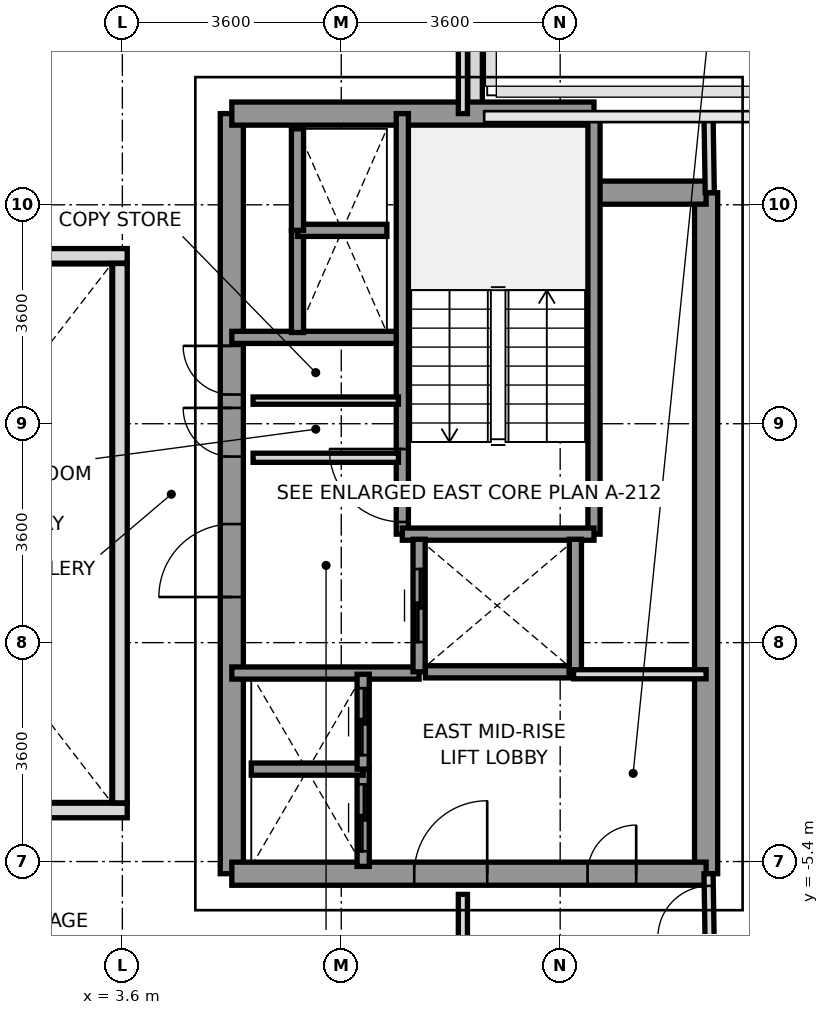
"""IFC4 building model, lengths in metres.
Left out: names, types, materials, properties, quantities, classifications, styles, units other than length and angle.
Written with IfcOpenShell. Run it as: python <this file> out.ifc"""

import sys

from ifc_helpers import new_model, si_unit, direction, frame, frame_2d, origin, place, context, subcontext, project, spatial, rectangle, extrude, source, transform, mapped, element, fill, save


model = new_model("IFC4")
c1 = context("Model", 3, precision=1e-05, world=origin(), true_north=direction((0.0, 1.0)))
c2 = subcontext(c1, "Body", "Model", "MODEL_VIEW")
j1 = project(units=[si_unit("LENGTHUNIT", "METRE"), si_unit("PLANEANGLEUNIT", "RADIAN")], contexts=[c1])
p1 = place(None, origin())
s1 = spatial("IfcSite", under=j1, at=p1, CompositionType="ELEMENT")
p2 = place(p1, origin())
s2 = spatial("IfcBuilding", under=s1, at=p2, CompositionType="ELEMENT")
p3 = place(p2, frame((0.0, 0.0, 167.2)))
s3 = spatial("IfcBuildingStorey", under=s2, at=p3, CompositionType="ELEMENT", Elevation=167.2)
p4 = place(p3, frame((9.4, 8.547, 0.0), z_axis=(0.0, 0.0, 1.0), x_axis=(0.0, -1.0, 0.0)))
e1 = element("IfcWall", 1, at=p4, inside=s3, PredefinedType="PARAPET", context=c2, shape_type="SweptSolid", body=[
    extrude(rectangle(XDim=1.594, YDim=0.24, at=frame_2d((0.797, 0.0))), origin(), (0.0, 0.0, 1.0), 1.15),
])
p5 = place(p3, frame((13.2, -5.6, 0.0), z_axis=(0.0, 0.0, 1.0), x_axis=(0.0, 1.0, 0.0)))
e2 = element("IfcWall", 2, at=p5, inside=s3, PredefinedType="SHEAR", context=c2, shape_type="SweptSolid", body=[
    extrude(rectangle(XDim=11.2, YDim=0.38, at=frame_2d((5.6, 0.0))), origin(), (0.0, 0.0, 1.0), 3.2),
])
p6 = place(p3, frame((5.4, -5.6, 0.0), z_axis=(0.0, 0.0, 1.0), x_axis=(0.0, 1.0, 0.0)))
e3 = element("IfcWall", 3, at=p6, inside=s3, PredefinedType="SHEAR", context=c2, shape_type="SweptSolid", body=[
    extrude(rectangle(XDim=12.5, YDim=0.38, at=frame_2d((6.25, 0.0))), origin(), (0.0, 0.0, 1.0), 3.2),
])
p7 = place(p6, frame((4.55, 0.0, 0.0)))
e4 = element("IfcOpeningElement", 4, at=p7, cuts=e3, PredefinedType="OPENING", context=c2, shape_type="SweptSolid", body=[
    extrude(rectangle(XDim=1.2, YDim=2.2, at=frame_2d((0.6, 1.1))), frame((0.0, 0.2, 0.0), z_axis=(0.0, -1.0, 0.0), x_axis=(1.0, 0.0, 0.0)), (0.0, 0.0, 1.0), 0.4),
])
p8 = place(p6, frame((6.86, 0.0, 0.0)))
e5 = element("IfcOpeningElement", 5, at=p8, cuts=e3, PredefinedType="OPENING", context=c2, shape_type="SweptSolid", body=[
    extrude(rectangle(XDim=0.8, YDim=2.1, at=frame_2d((0.4, 1.05))), frame((0.0, 0.2, 0.0), z_axis=(0.0, -1.0, 0.0), x_axis=(1.0, 0.0, 0.0)), (0.0, 0.0, 1.0), 0.4),
])
p9 = place(p6, frame((7.88, 0.0, 0.0)))
e6 = element("IfcOpeningElement", 6, at=p9, cuts=e3, PredefinedType="OPENING", context=c2, shape_type="SweptSolid", body=[
    extrude(rectangle(XDim=0.8, YDim=2.1, at=frame_2d((0.4, 1.05))), frame((0.0, 0.2, 0.0), z_axis=(0.0, -1.0, 0.0), x_axis=(1.0, 0.0, 0.0)), (0.0, 0.0, 1.0), 0.4),
])
p10 = place(p3, frame((5.4, 6.9, 0.0), z_axis=(0.0, 0.0, 1.0), x_axis=(1.0, 0.0, 0.0)))
e7 = element("IfcWall", 7, at=p10, inside=s3, PredefinedType="SHEAR", context=c2, shape_type="SweptSolid", body=[
    extrude(rectangle(XDim=5.956, YDim=0.38, at=frame_2d((2.978, 0.0))), origin(), (0.0, 0.0, 1.0), 3.2),
])
p11 = place(p3, frame((11.356, 5.6, 0.0), z_axis=(0.0, 0.0, 1.0), x_axis=(1.0, 0.0, 0.0)))
e8 = element("IfcWall", 8, at=p11, inside=s3, PredefinedType="SHEAR", context=c2, shape_type="SweptSolid", body=[
    extrude(rectangle(XDim=1.844, YDim=0.38, at=frame_2d((0.922, 0.0))), origin(), (0.0, 0.0, 1.0), 3.2),
])
p12 = place(p3, frame((5.4, -5.6, 0.0), z_axis=(0.0, 0.0, 1.0), x_axis=(1.0, 0.0, 0.0)))
e9 = element("IfcWall", 9, at=p12, inside=s3, PredefinedType="SHEAR", context=c2, shape_type="SweptSolid", body=[
    extrude(rectangle(XDim=7.8, YDim=0.38, at=frame_2d((3.9, 0.0))), origin(), (0.0, 0.0, 1.0), 3.2),
])
p13 = place(p12, frame((3.0, 0.0, 0.0)))
e10 = element("IfcOpeningElement", 10, at=p13, cuts=e9, PredefinedType="OPENING", context=c2, shape_type="SweptSolid", body=[
    extrude(rectangle(XDim=1.2, YDim=2.2, at=frame_2d((0.6, 1.1))), frame((0.0, 0.2, 0.0), z_axis=(0.0, -1.0, 0.0), x_axis=(1.0, 0.0, 0.0)), (0.0, 0.0, 1.0), 0.4),
])
p14 = place(p12, frame((5.85, 0.0, 0.0)))
e11 = element("IfcOpeningElement", 11, at=p14, cuts=e9, PredefinedType="OPENING", context=c2, shape_type="SweptSolid", body=[
    extrude(rectangle(XDim=0.8, YDim=2.1, at=frame_2d((0.4, 1.05))), frame((0.0, 0.2, 0.0), z_axis=(0.0, -1.0, 0.0), x_axis=(1.0, 0.0, 0.0)), (0.0, 0.0, 1.0), 0.4),
])
p15 = place(p3, frame((5.4, 3.22, 0.0), z_axis=(0.0, 0.0, 1.0), x_axis=(1.0, 0.0, 0.0)))
e12 = element("IfcWall", 12, at=p15, inside=s3, PredefinedType="SOLIDWALL", context=c2, shape_type="SweptSolid", body=[
    extrude(rectangle(XDim=2.78, YDim=0.2, at=frame_2d((1.39, 0.0))), origin(), (0.0, 0.0, 1.0), 3.2),
])
p16 = place(p3, frame((5.4, -2.3, 0.0), z_axis=(0.0, 0.0, 1.0), x_axis=(1.0, 0.0, 0.0)))
e13 = element("IfcWall", 13, at=p16, inside=s3, PredefinedType="SOLIDWALL", context=c2, shape_type="SweptSolid", body=[
    extrude(rectangle(XDim=3.08, YDim=0.2, at=frame_2d((1.54, 0.0))), origin(), (0.0, 0.0, 1.0), 3.2),
])
p17 = place(p3, frame((8.204, -0.016, 0.0), z_axis=(0.0, 0.0, 1.0), x_axis=(0.0, 1.0, 0.0)))
e14 = element("IfcWall", 14, at=p17, inside=s3, PredefinedType="SOLIDWALL", context=c2, shape_type="SweptSolid", body=[
    extrude(rectangle(XDim=6.916, YDim=0.2, at=frame_2d((3.458, 0.0))), origin(), (0.0, 0.0, 1.0), 3.2),
])
p18 = place(p17, frame((0.2, 0.0, 0.0)))
e15 = element("IfcOpeningElement", 15, at=p18, cuts=e14, PredefinedType="OPENING", context=c2, shape_type="SweptSolid", body=[
    extrude(rectangle(XDim=1.2, YDim=2.2, at=frame_2d((0.6, 1.1))), frame((0.0, 0.11, 0.0), z_axis=(0.0, -1.0, 0.0), x_axis=(1.0, 0.0, 0.0)), (0.0, 0.0, 1.0), 0.22),
])
p19 = place(p3, frame((11.356, -0.016, 0.0), z_axis=(0.0, 0.0, 1.0), x_axis=(0.0, 1.0, 0.0)))
e16 = element("IfcWall", 16, at=p19, inside=s3, PredefinedType="SOLIDWALL", context=c2, shape_type="SweptSolid", body=[
    extrude(rectangle(XDim=6.916, YDim=0.2, at=frame_2d((3.458, 0.0))), origin(), (0.0, 0.0, 1.0), 3.2),
])
p20 = place(p3, frame((8.204, -0.016, 0.0), z_axis=(0.0, 0.0, 1.0), x_axis=(1.0, 0.0, 0.0)))
e17 = element("IfcWall", 17, at=p20, inside=s3, PredefinedType="SOLIDWALL", context=c2, shape_type="SweptSolid", body=[
    extrude(rectangle(XDim=3.152, YDim=0.2, at=frame_2d((1.576, 0.0))), origin(), (0.0, 0.0, 1.0), 3.2),
])
p21 = place(p3, frame((8.48, -2.28, 0.0), z_axis=(0.0, 0.0, 1.0), x_axis=(0.0, 1.0, 0.0)))
e18 = element("IfcWall", 18, at=p21, inside=s3, PredefinedType="SOLIDWALL", context=c2, shape_type="SweptSolid", body=[
    extrude(rectangle(XDim=2.18, YDim=0.2, at=frame_2d((1.09, 0.0))), origin(), (0.0, 0.0, 1.0), 3.2),
])
p22 = place(p21, frame((0.49, 0.0, 0.0)))
e19 = element("IfcOpeningElement", 19, at=p22, cuts=e18, PredefinedType="OPENING", context=c2, shape_type="SweptSolid", body=[
    extrude(rectangle(XDim=1.2, YDim=2.2, at=frame_2d((0.6, 1.1))), frame((0.0, 0.11, 0.0), z_axis=(0.0, -1.0, 0.0), x_axis=(1.0, 0.0, 0.0)), (0.0, 0.0, 1.0), 0.22),
])
p23 = place(p3, frame((11.05, -2.28, 0.0), z_axis=(0.0, 0.0, 1.0), x_axis=(0.0, 1.0, 0.0)))
e20 = element("IfcWall", 20, at=p23, inside=s3, PredefinedType="SOLIDWALL", context=c2, shape_type="SweptSolid", body=[
    extrude(rectangle(XDim=2.18, YDim=0.2, at=frame_2d((1.09, 0.0))), origin(), (0.0, 0.0, 1.0), 3.2),
])
p24 = place(p3, frame((8.584, -2.28, 0.0), z_axis=(0.0, 0.0, 1.0), x_axis=(1.0, 0.0, 0.0)))
e21 = element("IfcWall", 21, at=p24, inside=s3, PredefinedType="SOLIDWALL", context=c2, shape_type="SweptSolid", body=[
    extrude(rectangle(XDim=2.362, YDim=0.2, at=frame_2d((1.181, 0.0))), origin(), (0.0, 0.0, 1.0), 3.2),
])
p25 = place(p3, frame((7.56, -5.48, 0.0), z_axis=(0.0, 0.0, 1.0), x_axis=(0.0, 1.0, 0.0)))
e22 = element("IfcWall", 22, at=p25, inside=s3, PredefinedType="SOLIDWALL", context=c2, shape_type="SweptSolid", body=[
    extrude(rectangle(XDim=1.6, YDim=0.2, at=frame_2d((0.8, 0.0))), origin(), (0.0, 0.0, 1.0), 3.2),
])
p26 = place(p25, frame((0.25, 0.0, 0.0)))
e23 = element("IfcOpeningElement", 23, at=p26, cuts=e22, PredefinedType="OPENING", context=c2, shape_type="SweptSolid", body=[
    extrude(rectangle(XDim=1.1, YDim=2.2, at=frame_2d((0.55, 1.1))), frame((0.0, 0.11, 0.0), z_axis=(0.0, -1.0, 0.0), x_axis=(1.0, 0.0, 0.0)), (0.0, 0.0, 1.0), 0.22),
])
p27 = place(p3, frame((5.72, -3.88, 0.0), z_axis=(0.0, 0.0, 1.0), x_axis=(1.0, 0.0, 0.0)))
e24 = element("IfcWall", 24, at=p27, inside=s3, PredefinedType="SOLIDWALL", context=c2, shape_type="SweptSolid", body=[
    extrude(rectangle(XDim=1.84, YDim=0.2, at=frame_2d((0.92, 0.0))), origin(), (0.0, 0.0, 1.0), 3.2),
])
p28 = place(p3, frame((7.56, -3.88, 0.0), z_axis=(0.0, 0.0, 1.0), x_axis=(0.0, 1.0, 0.0)))
e25 = element("IfcWall", 25, at=p28, inside=s3, PredefinedType="SOLIDWALL", context=c2, shape_type="SweptSolid", body=[
    extrude(rectangle(XDim=1.56, YDim=0.2, at=frame_2d((0.78, 0.0))), origin(), (0.0, 0.0, 1.0), 3.2),
])
p29 = place(p28, frame((0.23, 0.0, 0.0)))
e26 = element("IfcOpeningElement", 26, at=p29, cuts=e25, PredefinedType="OPENING", context=c2, shape_type="SweptSolid", body=[
    extrude(rectangle(XDim=1.1, YDim=2.2, at=frame_2d((0.55, 1.1))), frame((0.0, 0.11, 0.0), z_axis=(0.0, -1.0, 0.0), x_axis=(1.0, 0.0, 0.0)), (0.0, 0.0, 1.0), 0.22),
])
p30 = place(p3, frame((6.48, 3.3, 0.0), z_axis=(0.0, 0.0, 1.0), x_axis=(0.0, 1.0, 0.0)))
e27 = element("IfcWall", 27, at=p30, inside=s3, PredefinedType="SOLIDWALL", context=c2, shape_type="SweptSolid", body=[
    extrude(rectangle(XDim=1.68, YDim=0.2, at=frame_2d((0.84, 0.0))), origin(), (0.0, 0.0, 1.0), 3.2),
])
p31 = place(p3, frame((6.48, 4.98, 0.0), z_axis=(0.0, 0.0, 1.0), x_axis=(1.0, 0.0, 0.0)))
e28 = element("IfcWall", 28, at=p31, inside=s3, PredefinedType="SOLIDWALL", context=c2, shape_type="SweptSolid", body=[
    extrude(rectangle(XDim=1.47, YDim=0.2, at=frame_2d((0.735, 0.0))), origin(), (0.0, 0.0, 1.0), 3.2),
])
p32 = place(p3, frame((6.48, 4.98, 0.0), z_axis=(0.0, 0.0, 1.0), x_axis=(0.0, 1.0, 0.0)))
e29 = element("IfcWall", 29, at=p32, inside=s3, PredefinedType="SOLIDWALL", context=c2, shape_type="SweptSolid", body=[
    extrude(rectangle(XDim=1.67, YDim=0.2, at=frame_2d((0.835, 0.0))), origin(), (0.0, 0.0, 1.0), 3.2),
])
p33 = place(p3, frame((5.75, 1.24, 0.0), z_axis=(0.0, 0.0, 1.0), x_axis=(1.0, 0.0, 0.0)))
e30 = element("IfcWall", 30, at=p33, inside=s3, PredefinedType="PARTITIONING", context=c2, shape_type="SweptSolid", body=[
    extrude(rectangle(XDim=2.39, YDim=0.15, at=frame_2d((1.195, 0.0))), origin(), (0.0, 0.0, 1.0), 2.3),
])
p34 = place(p3, frame((5.75, 2.18, 0.0), z_axis=(0.0, 0.0, 1.0), x_axis=(1.0, 0.0, 0.0)))
e31 = element("IfcWall", 31, at=p34, inside=s3, PredefinedType="PARTITIONING", context=c2, shape_type="SweptSolid", body=[
    extrude(rectangle(XDim=2.39, YDim=0.12, at=frame_2d((1.195, 0.0))), origin(), (0.0, 0.0, 1.0), 2.3),
])
p35 = place(p3, frame((11.02, -2.32, 0.0), z_axis=(0.0, 0.0, 1.0), x_axis=(1.0, 0.0, 0.0)))
e32 = element("IfcWall", 32, at=p35, inside=s3, PredefinedType="PARTITIONING", context=c2, shape_type="SweptSolid", body=[
    extrude(rectangle(XDim=2.18, YDim=0.15, at=frame_2d((1.09, 0.0))), origin(), (0.0, 0.0, 1.0), 3.2),
])
p36 = place(p3, frame((9.2, 6.9, 0.0), z_axis=(0.0, 0.0, 1.0), x_axis=(0.0, 1.0, 0.0)))
e33 = element("IfcWall", 33, at=p36, inside=s3, PredefinedType="PARTITIONING", context=c2, shape_type="SweptSolid", body=[
    extrude(rectangle(XDim=8.78, YDim=0.15, at=frame_2d((4.39, 0.0))), origin(), (0.0, 0.0, 1.0), 2.75),
])
p37 = place(p3, frame((9.2, -15.68, 0.0), z_axis=(0.0, 0.0, 1.0), x_axis=(0.0, 1.0, 0.0)))
e34 = element("IfcWall", 34, at=p37, inside=s3, PredefinedType="PARTITIONING", context=c2, shape_type="SweptSolid", body=[
    extrude(rectangle(XDim=9.74, YDim=0.15, at=frame_2d((4.87, 0.0))), origin(), (0.0, 0.0, 1.0), 2.75),
])
p38 = place(p3, frame((13.26, 5.6, 0.0), z_axis=(0.0, 0.0, 1.0), x_axis=(-0.016013571389, 0.999871774545, 0.0)))
e35 = element("IfcWall", 35, at=p38, inside=s3, PredefinedType="PARTITIONING", context=c2, shape_type="SweptSolid", body=[
    extrude(rectangle(XDim=1.25, YDim=0.15, at=frame_2d((0.625, 0.0))), origin(), (0.0, 0.0, 1.0), 3.2),
])
p39 = place(p3, frame((13.26, -6.85, 0.0), z_axis=(0.0, 0.0, 1.0), x_axis=(-0.016013571389, 0.999871774545, 0.0)))
e36 = element("IfcWall", 36, at=p39, inside=s3, PredefinedType="PARTITIONING", context=c2, shape_type="SweptSolid", body=[
    extrude(rectangle(XDim=1.25, YDim=0.15, at=frame_2d((0.625, 0.0))), origin(), (0.0, 0.0, 1.0), 3.2),
])
p40 = place(p39, frame((0.2, 0.0, 0.0)))
e37 = element("IfcOpeningElement", 37, at=p40, cuts=e36, PredefinedType="OPENING", context=c2, shape_type="SweptSolid", body=[
    extrude(rectangle(XDim=0.85, YDim=2.1, at=frame_2d((0.425, 1.05))), frame((0.0, 0.085, 0.0), z_axis=(0.0, -1.0, 0.0), x_axis=(1.0, 0.0, 0.0)), (0.0, 0.0, 1.0), 0.17),
])
for number, where, z_axis, x_axis in (
    (38, (-3.68, -4.56, 0.0), (0.0, 0.0, 1.0), (1.0, 0.0, 0.0)),
    (39, (-3.68, 4.56, 0.0), (0.0, 0.0, 1.0), (1.0, 0.0, 0.0)),
):
    element("IfcWall", number, at=place(p3, frame(where, z_axis=z_axis, x_axis=x_axis)), inside=s3, PredefinedType="PARAPET", context=c2, shape_type="SweptSolid", body=[
        extrude(rectangle(XDim=7.36, YDim=0.24, at=frame_2d((3.68, 0.0))), origin(), (0.0, 0.0, 1.0), 1.15),
    ])
p41 = place(p3, frame((3.56, -4.435, 0.0), z_axis=(0.0, 0.0, 1.0), x_axis=(0.0, 1.0, 0.0)))
e40 = element("IfcWall", 40, at=p41, inside=s3, PredefinedType="PARAPET", context=c2, shape_type="SweptSolid", body=[
    extrude(rectangle(XDim=8.87, YDim=0.24, at=frame_2d((4.435, 0.0))), origin(), (0.0, 0.0, 1.0), 1.15),
])
m1 = source(origin(), c2, "Body", "SweptSolid", [
    extrude(rectangle(XDim=1.2, YDim=2.2, at=frame_2d((0.6, 1.1))), frame((0.0, 0.025, 0.0), z_axis=(0.0, -1.0, 0.0), x_axis=(1.0, 0.0, 0.0)), (0.0, 0.0, 1.0), 0.05),
])
p42 = place(p18, origin())
e41 = element("IfcDoor", 41, at=p42, inside=s3, OperationType="SINGLE_SWING_RIGHT", PredefinedType="DOOR", context=c2, shape_type="MappedRepresentation", body=[
    mapped(m1, transform((0.0, 0.0, 0.0), x_axis=(1.0, 0.0, 0.0), y_axis=(0.0, 1.0, 0.0), z_axis=(0.0, 0.0, 1.0), scale=1.0)),
])
fill(e15, e41)
p43 = place(p7, origin())
e42 = element("IfcDoor", 42, at=p43, inside=s3, OperationType="SINGLE_SWING_LEFT", PredefinedType="DOOR", context=c2, shape_type="MappedRepresentation", body=[
    mapped(m1, transform((0.0, 0.0, 0.0), x_axis=(1.0, 0.0, 0.0), y_axis=(0.0, 1.0, 0.0), z_axis=(0.0, 0.0, 1.0), scale=1.0)),
])
fill(e4, e42)
p44 = place(p13, origin())
e43 = element("IfcDoor", 43, at=p44, inside=s3, OperationType="SINGLE_SWING_RIGHT", PredefinedType="DOOR", context=c2, shape_type="MappedRepresentation", body=[
    mapped(m1, transform((0.0, 0.0, 0.0), x_axis=(1.0, 0.0, 0.0), y_axis=(0.0, 1.0, 0.0), z_axis=(0.0, 0.0, 1.0), scale=1.0)),
])
fill(e10, e43)
m2 = source(origin(), c2, "Body", "SweptSolid", [
    extrude(rectangle(XDim=0.8, YDim=2.1, at=frame_2d((0.4, 1.05))), frame((0.0, 0.025, 0.0), z_axis=(0.0, -1.0, 0.0), x_axis=(1.0, 0.0, 0.0)), (0.0, 0.0, 1.0), 0.05),
])
p45 = place(p8, origin())
e44 = element("IfcDoor", 44, at=p45, inside=s3, OperationType="SINGLE_SWING_RIGHT", PredefinedType="DOOR", context=c2, shape_type="MappedRepresentation", body=[
    mapped(m2, transform((0.0, 0.0, 0.0), x_axis=(1.0, 0.0, 0.0), y_axis=(0.0, 1.0, 0.0), z_axis=(0.0, 0.0, 1.0), scale=1.0)),
])
fill(e5, e44)
p46 = place(p9, origin())
e45 = element("IfcDoor", 45, at=p46, inside=s3, OperationType="SINGLE_SWING_RIGHT", PredefinedType="DOOR", context=c2, shape_type="MappedRepresentation", body=[
    mapped(m2, transform((0.0, 0.0, 0.0), x_axis=(1.0, 0.0, 0.0), y_axis=(0.0, 1.0, 0.0), z_axis=(0.0, 0.0, 1.0), scale=1.0)),
])
fill(e6, e45)
p47 = place(p14, origin())
e46 = element("IfcDoor", 46, at=p47, inside=s3, OperationType="SINGLE_SWING_RIGHT", PredefinedType="DOOR", context=c2, shape_type="MappedRepresentation", body=[
    mapped(m2, transform((0.0, 0.0, 0.0), x_axis=(1.0, 0.0, 0.0), y_axis=(0.0, 1.0, 0.0), z_axis=(0.0, 0.0, 1.0), scale=1.0)),
])
fill(e11, e46)
p48 = place(p22, origin())
e47 = element("IfcDoor", 47, at=p48, inside=s3, OperationType="SLIDING_TO_RIGHT", PredefinedType="DOOR", context=c2, shape_type="MappedRepresentation", body=[
    mapped(m1, transform((0.0, 0.0, 0.0), x_axis=(1.0, 0.0, 0.0), y_axis=(0.0, 1.0, 0.0), z_axis=(0.0, 0.0, 1.0), scale=1.0)),
])
fill(e19, e47)
m3 = source(origin(), c2, "Body", "SweptSolid", [
    extrude(rectangle(XDim=1.1, YDim=2.2, at=frame_2d((0.55, 1.1))), frame((0.0, 0.025, 0.0), z_axis=(0.0, -1.0, 0.0), x_axis=(1.0, 0.0, 0.0)), (0.0, 0.0, 1.0), 0.05),
])
p49 = place(p26, origin())
e48 = element("IfcDoor", 48, at=p49, inside=s3, OperationType="SLIDING_TO_LEFT", PredefinedType="DOOR", context=c2, shape_type="MappedRepresentation", body=[
    mapped(m3, transform((0.0, 0.0, 0.0), x_axis=(1.0, 0.0, 0.0), y_axis=(0.0, 1.0, 0.0), z_axis=(0.0, 0.0, 1.0), scale=1.0)),
])
fill(e23, e48)
p50 = place(p29, origin())
e49 = element("IfcDoor", 49, at=p50, inside=s3, OperationType="SLIDING_TO_LEFT", PredefinedType="DOOR", context=c2, shape_type="MappedRepresentation", body=[
    mapped(m3, transform((0.0, 0.0, 0.0), x_axis=(1.0, 0.0, 0.0), y_axis=(0.0, 1.0, 0.0), z_axis=(0.0, 0.0, 1.0), scale=1.0)),
])
fill(e26, e49)
m4 = source(origin(), c2, "Body", "SweptSolid", [
    extrude(rectangle(XDim=0.85, YDim=2.1, at=frame_2d((0.425, 1.05))), frame((0.0, 0.025, 0.0), z_axis=(0.0, -1.0, 0.0), x_axis=(1.0, 0.0, 0.0)), (0.0, 0.0, 1.0), 0.05),
])
p51 = place(p40, origin())
e50 = element("IfcDoor", 50, at=p51, inside=s3, OperationType="SINGLE_SWING_LEFT", PredefinedType="DOOR", context=c2, shape_type="MappedRepresentation", body=[
    mapped(m4, transform((0.0, 0.0, 0.0), x_axis=(1.0, 0.0, 0.0), y_axis=(0.0, 1.0, 0.0), z_axis=(0.0, 0.0, 1.0), scale=1.0)),
])
fill(e37, e50)
save(model, sys.argv[1])
